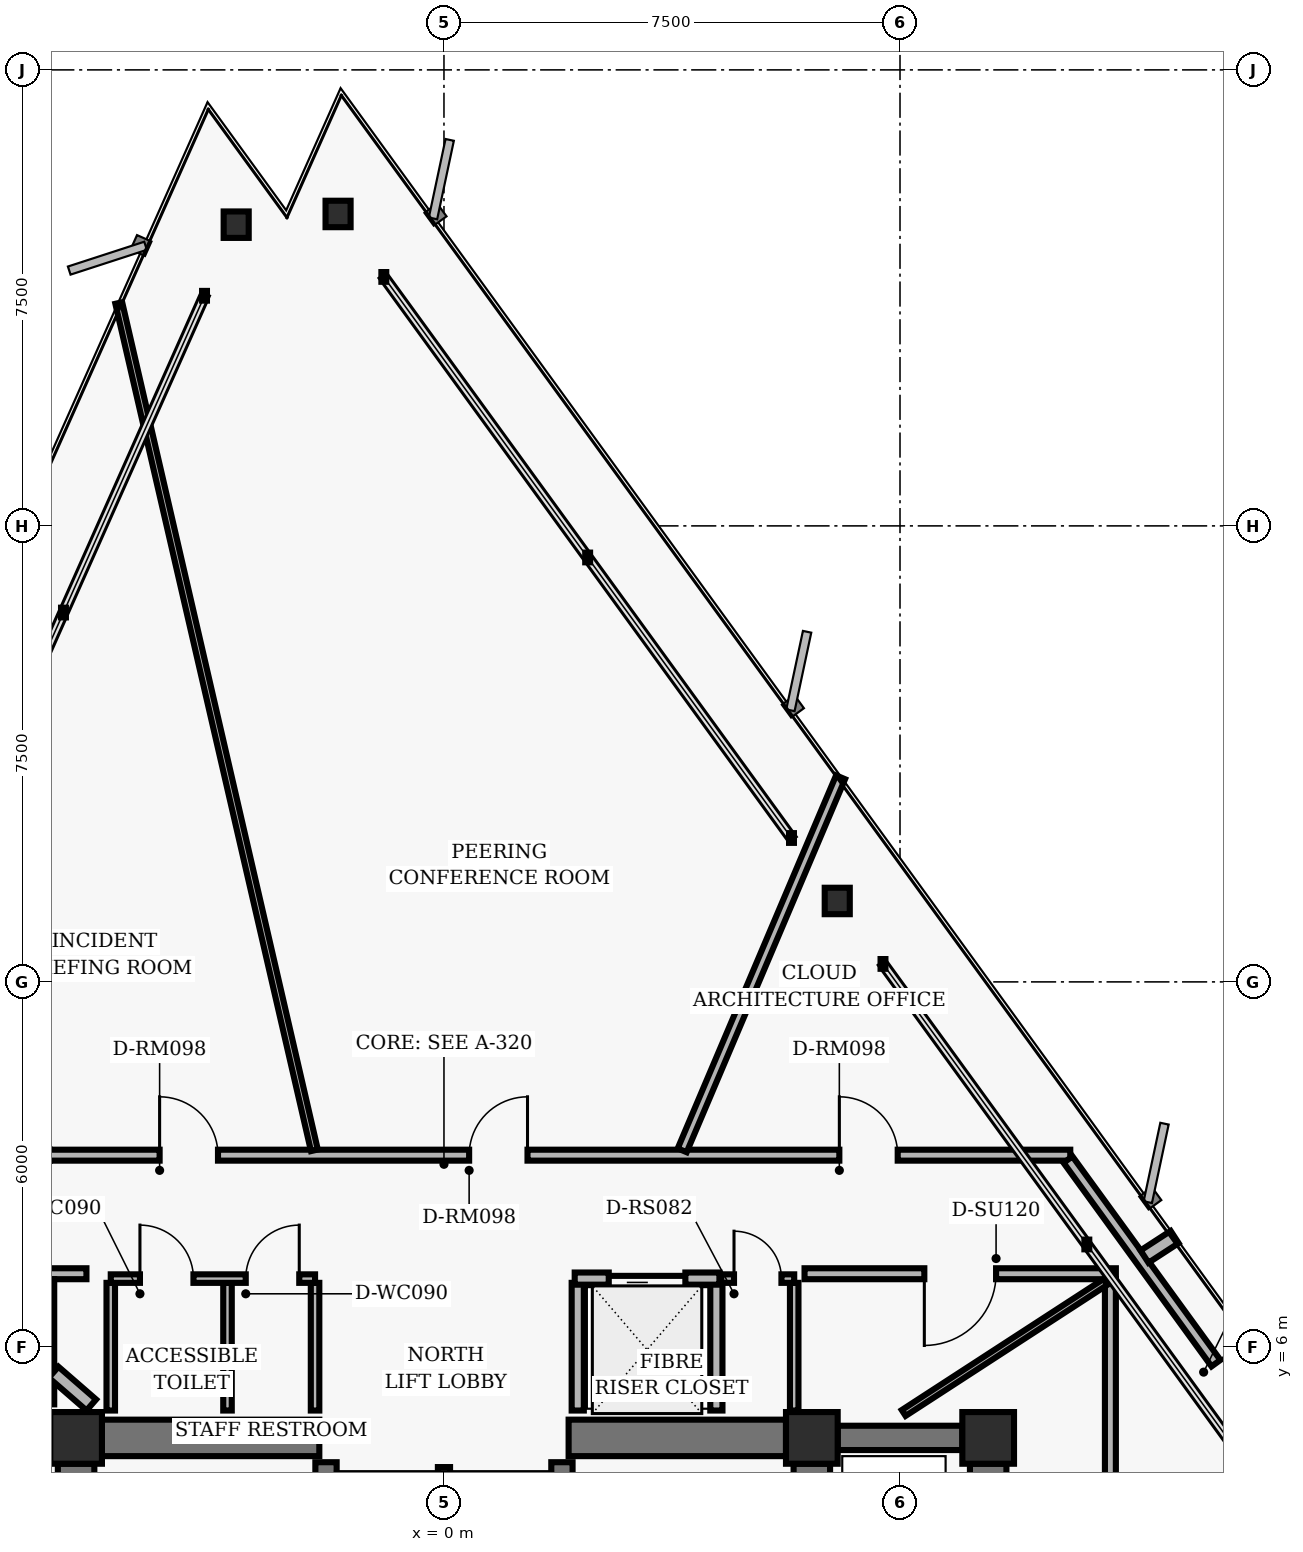
"""IFC4 building model, lengths in metres.
Left out: names, types, materials, properties, quantities, classifications, styles, units other than length and angle.
Written with IfcOpenShell. Run it as: python <this file> out.ifc"""

import sys

from ifc_helpers import new_model, si_unit, direction, frame, frame_2d, origin, origin_2d, place, context, subcontext, project, spatial, rectangle, hollow_rectangle, i_section, extrude, element, fill, save


model = new_model("IFC4")
c1 = context("Model", 3, precision=1e-05, world=origin(), true_north=direction((0.0, 1.0)))
c2 = subcontext(c1, "Body", "Model", "MODEL_VIEW")
j1 = project(units=[si_unit("LENGTHUNIT", "METRE"), si_unit("PLANEANGLEUNIT", "RADIAN")], contexts=[c1])
p1 = place(None, origin())
s1 = spatial("IfcSite", under=j1, at=p1, CompositionType="ELEMENT")
p2 = place(p1, origin())
s2 = spatial("IfcBuilding", under=s1, at=p2, CompositionType="ELEMENT")
p3 = place(p2, frame((0.0, 0.0, 113.76)))
s3 = spatial("IfcBuildingStorey", under=s2, at=p3, CompositionType="ELEMENT", Elevation=113.76)
for number, where, z_axis, x_axis in (
    (1, (-6.05, 4.5, 0.0), (0.0, 0.0, 1.0), (1.0, 0.0, 0.0)),
    (2, (6.05, 4.5, 0.0), (0.0, 0.0, 1.0), (1.0, 0.0, 0.0)),
    (3, (8.95, 4.5, 0.0), (0.0, 0.0, 1.0), (1.0, 0.0, 0.0)),
):
    element("IfcColumn", number, at=place(p3, frame(where, z_axis=z_axis, x_axis=x_axis)), inside=s3, PredefinedType="COLUMN", context=c2, shape_type="SweptSolid", body=[
        extrude(hollow_rectangle(XDim=0.85, YDim=0.85, WallThickness=0.055, InnerFilletRadius=0.02, OuterFilletRadius=0.04, at=origin_2d()), origin(), (0.0, 0.0, 1.0), 3.04),
    ])
for number, where, z_axis, x_axis in (
    (4, (-6.05, 0.425, 0.0), (0.0, 0.0, 1.0), (0.0, 1.0, 0.0)),
    (5, (6.05, 0.425, 0.0), (0.0, 0.0, 1.0), (0.0, 1.0, 0.0)),
):
    element("IfcWall", number, at=place(p3, frame(where, z_axis=z_axis, x_axis=x_axis)), inside=s3, PredefinedType="SHEAR", context=c2, shape_type="SweptSolid", body=[
        extrude(rectangle(XDim=3.65, YDim=0.6, at=frame_2d((1.825, 0.0))), origin(), (0.0, 0.0, 1.0), 2.788),
    ])
for number, where, z_axis, x_axis in (
    (6, (-1.94, -4.1, 0.0), (0.0, 0.0, 1.0), (0.0, 1.0, 0.0)),
    (7, (1.94, -4.1, 0.0), (0.0, 0.0, 1.0), (0.0, 1.0, 0.0)),
):
    element("IfcWall", number, at=place(p3, frame(where, z_axis=z_axis, x_axis=x_axis)), inside=s3, PredefinedType="SHEAR", context=c2, shape_type="SweptSolid", body=[
        extrude(rectangle(XDim=8.2, YDim=0.35, at=frame_2d((4.1, 0.0))), origin(), (0.0, 0.0, 1.0), 2.788),
    ])
for number, where, z_axis, x_axis in (
    (8, (-5.625, 4.5, 0.0), (0.0, 0.0, 1.0), (1.0, 0.0, 0.0)),
    (9, (2.05, 4.5, 0.0), (0.0, 0.0, 1.0), (1.0, 0.0, 0.0)),
):
    element("IfcWall", number, at=place(p3, frame(where, z_axis=z_axis, x_axis=x_axis)), inside=s3, PredefinedType="SHEAR", context=c2, shape_type="SweptSolid", body=[
        extrude(rectangle(XDim=3.575, YDim=0.6, at=frame_2d((1.788, 0.0))), origin(), (0.0, 0.0, 1.0), 2.788),
    ])
p4 = place(p3, frame((8.95, -3.875, 0.0), z_axis=(0.0, 0.0, 1.0), x_axis=(0.0, 1.0, 0.0)))
e10 = element("IfcWall", 10, at=p4, inside=s3, PredefinedType="SHEAR", context=c2, shape_type="SweptSolid", body=[
    extrude(rectangle(XDim=7.95, YDim=0.6, at=frame_2d((3.975, 0.0))), origin(), (0.0, 0.0, 1.0), 2.788),
])
p5 = place(p4, frame((0.55, 0.0, 0.0)))
e11 = element("IfcOpeningElement", 11, at=p5, cuts=e10, PredefinedType="OPENING", context=c2, shape_type="SweptSolid", body=[
    extrude(rectangle(XDim=1.06, YDim=2.04, at=frame_2d((0.53, 1.02))), frame((0.0, 0.31, 0.0), z_axis=(0.0, -1.0, 0.0), x_axis=(1.0, 0.0, 0.0)), (0.0, 0.0, 1.0), 0.62),
])
p6 = place(p4, frame((3.445, 0.0, 0.0)))
e12 = element("IfcOpeningElement", 12, at=p6, cuts=e10, PredefinedType="OPENING", context=c2, shape_type="SweptSolid", body=[
    extrude(rectangle(XDim=1.06, YDim=2.04, at=frame_2d((0.53, 1.02))), frame((0.0, 0.31, 0.0), z_axis=(0.0, -1.0, 0.0), x_axis=(1.0, 0.0, 0.0)), (0.0, 0.0, 1.0), 0.62),
])
p7 = place(p4, frame((6.33, 0.0, 0.0)))
e13 = element("IfcOpeningElement", 13, at=p7, cuts=e10, PredefinedType="OPENING", context=c2, shape_type="SweptSolid", body=[
    extrude(rectangle(XDim=1.06, YDim=2.04, at=frame_2d((0.53, 1.02))), frame((0.0, 0.31, 0.0), z_axis=(0.0, -1.0, 0.0), x_axis=(1.0, 0.0, 0.0)), (0.0, 0.0, 1.0), 0.62),
])
p8 = place(p3, frame((6.475, 4.5, 0.0), z_axis=(0.0, 0.0, 1.0), x_axis=(1.0, 0.0, 0.0)))
e14 = element("IfcWall", 14, at=p8, inside=s3, PredefinedType="SHEAR", context=c2, shape_type="SweptSolid", body=[
    extrude(rectangle(XDim=2.05, YDim=0.4, at=frame_2d((1.025, 0.0))), origin(), (0.0, 0.0, 1.0), 2.788),
])
for number, where, z_axis, x_axis in (
    (15, (6.468, 13.331, 0.0), (0.0, 0.0, 1.0), (1.0, 0.0, 0.0)),
    (16, (-1.742, 24.63, 0.0), (0.0, 0.0, 1.0), (1.0, 0.0, 0.0)),
    (17, (-3.417, 24.454, 0.0), (0.0, 0.0, 1.0), (1.0, 0.0, 0.0)),
):
    element("IfcColumn", number, at=place(p3, frame(where, z_axis=z_axis, x_axis=x_axis)), inside=s3, PredefinedType="COLUMN", context=c2, shape_type="SweptSolid", body=[
        extrude(i_section(OverallWidth=0.412, OverallDepth=0.435, WebThickness=0.036, FlangeThickness=0.057, FilletRadius=0.022, at=origin_2d()), origin(), (0.0, 0.0, 1.0), 3.04),
    ])
p9 = place(p3, frame((0.0, 1.25, 0.0), z_axis=(0.0, 0.0, 1.0), x_axis=(0.0, 1.0, 0.0)))
e18 = element("IfcWall", 18, at=p9, inside=s3, PredefinedType="PARTITIONING", context=c2, shape_type="SweptSolid", body=[
    extrude(rectangle(XDim=2.77, YDim=0.2, at=frame_2d((1.385, 0.0))), origin(), (0.0, 0.0, 1.0), 2.763),
])
p10 = place(p3, frame((2.2, 4.95, 0.0), z_axis=(0.0, 0.0, 1.0), x_axis=(0.0, 1.0, 0.0)))
e19 = element("IfcWall", 19, at=p10, inside=s3, PredefinedType="PARTITIONING", context=c2, shape_type="SweptSolid", body=[
    extrude(rectangle(XDim=2.1, YDim=0.2, at=frame_2d((1.05, 0.0))), origin(), (0.0, 0.0, 1.0), 2.132),
])
p11 = place(p3, frame((4.48, 4.95, 0.0), z_axis=(0.0, 0.0, 1.0), x_axis=(0.0, 1.0, 0.0)))
e20 = element("IfcWall", 20, at=p11, inside=s3, PredefinedType="PARTITIONING", context=c2, shape_type="SweptSolid", body=[
    extrude(rectangle(XDim=2.1, YDim=0.2, at=frame_2d((1.05, 0.0))), origin(), (0.0, 0.0, 1.0), 2.763),
])
p12 = place(p3, frame((2.15, 7.12, 0.0), z_axis=(0.0, 0.0, 1.0), x_axis=(1.0, 0.0, 0.0)))
e21 = element("IfcWall", 21, at=p12, inside=s3, PredefinedType="PARTITIONING", context=c2, shape_type="SweptSolid", body=[
    extrude(rectangle(XDim=2.38, YDim=0.2, at=frame_2d((1.19, 0.0))), origin(), (0.0, 0.0, 1.0), 2.763),
])
p13 = place(p12, frame((0.56, 0.0, 0.0)))
e22 = element("IfcOpeningElement", 22, at=p13, cuts=e21, PredefinedType="OPENING", context=c2, shape_type="SweptSolid", body=[
    extrude(rectangle(XDim=1.26, YDim=2.06, at=frame_2d((0.63, 1.03))), frame((0.0, 0.11, 0.0), z_axis=(0.0, -1.0, 0.0), x_axis=(1.0, 0.0, 0.0)), (0.0, 0.0, 1.0), 0.22),
])
for number, where, z_axis, x_axis in (
    (23, (-5.48, 4.95, 0.0), (0.0, 0.0, 1.0), (0.0, 1.0, 0.0)),
    (24, (-3.56, 4.95, 0.0), (0.0, 0.0, 1.0), (0.0, 1.0, 0.0)),
    (25, (-2.12, 4.95, 0.0), (0.0, 0.0, 1.0), (0.0, 1.0, 0.0)),
):
    element("IfcWall", number, at=place(p3, frame(where, z_axis=z_axis, x_axis=x_axis)), inside=s3, PredefinedType="PARTITIONING", context=c2, shape_type="SweptSolid", body=[
        extrude(rectangle(XDim=2.1, YDim=0.14, at=frame_2d((1.05, 0.0))), origin(), (0.0, 0.0, 1.0), 2.763),
    ])
p14 = place(p3, frame((-5.48, 7.12, 0.0), z_axis=(0.0, 0.0, 1.0), x_axis=(1.0, 0.0, 0.0)))
e26 = element("IfcWall", 26, at=p14, inside=s3, PredefinedType="PARTITIONING", context=c2, shape_type="SweptSolid", body=[
    extrude(rectangle(XDim=3.36, YDim=0.14, at=frame_2d((1.68, 0.0))), origin(), (0.0, 0.0, 1.0), 2.763),
])
p15 = place(p14, frame((0.48, 0.0, 0.0)))
e27 = element("IfcOpeningElement", 27, at=p15, cuts=e26, PredefinedType="OPENING", context=c2, shape_type="SweptSolid", body=[
    extrude(rectangle(XDim=0.88, YDim=2.02, at=frame_2d((0.44, 1.01))), frame((0.0, 0.08, 0.0), z_axis=(0.0, -1.0, 0.0), x_axis=(1.0, 0.0, 0.0)), (0.0, 0.0, 1.0), 0.16),
])
p16 = place(p14, frame((2.22, 0.0, 0.0)))
e28 = element("IfcOpeningElement", 28, at=p16, cuts=e26, PredefinedType="OPENING", context=c2, shape_type="SweptSolid", body=[
    extrude(rectangle(XDim=0.88, YDim=2.02, at=frame_2d((0.44, 1.01))), frame((0.0, 0.08, 0.0), z_axis=(0.0, -1.0, 0.0), x_axis=(1.0, 0.0, 0.0)), (0.0, 0.0, 1.0), 0.16),
])
p17 = place(p3, frame((5.76, 4.95, 0.0), z_axis=(0.0, 0.0, 1.0), x_axis=(0.0, 1.0, 0.0)))
e29 = element("IfcWall", 29, at=p17, inside=s3, PredefinedType="PARTITIONING", context=c2, shape_type="SweptSolid", body=[
    extrude(rectangle(XDim=2.1, YDim=0.14, at=frame_2d((1.05, 0.0))), origin(), (0.0, 0.0, 1.0), 2.132),
])
p18 = place(p3, frame((4.56, 7.12, 0.0), z_axis=(0.0, 0.0, 1.0), x_axis=(1.0, 0.0, 0.0)))
e30 = element("IfcWall", 30, at=p18, inside=s3, PredefinedType="PARTITIONING", context=c2, shape_type="SweptSolid", body=[
    extrude(rectangle(XDim=1.2, YDim=0.14, at=frame_2d((0.6, 0.0))), origin(), (0.0, 0.0, 1.0), 2.763),
])
p19 = place(p18, frame((0.21, 0.0, 0.0)))
e31 = element("IfcOpeningElement", 31, at=p19, cuts=e30, PredefinedType="OPENING", context=c2, shape_type="SweptSolid", body=[
    extrude(rectangle(XDim=0.78, YDim=2.01, at=frame_2d((0.39, 1.005))), frame((0.0, 0.08, 0.0), z_axis=(0.0, -1.0, 0.0), x_axis=(1.0, 0.0, 0.0)), (0.0, 0.0, 1.0), 0.16),
])
p20 = place(p3, frame((-6.52, 9.15, 0.0), z_axis=(0.0, 0.0, 1.0), x_axis=(1.0, 0.0, 0.0)))
e32 = element("IfcWall", 32, at=p20, inside=s3, PredefinedType="PARTITIONING", context=c2, shape_type="SweptSolid", body=[
    extrude(rectangle(XDim=16.82, YDim=0.18, at=frame_2d((8.41, 0.0))), origin(), (0.0, 0.0, 1.0), 2.763),
])
p21 = place(p20, frame((13.022, 0.0, 0.0)))
e33 = element("IfcOpeningElement", 33, at=p21, cuts=e32, PredefinedType="OPENING", context=c2, shape_type="SweptSolid", body=[
    extrude(rectangle(XDim=0.96, YDim=2.02, at=frame_2d((0.48, 1.01))), frame((0.0, 0.1, 0.0), z_axis=(0.0, -1.0, 0.0), x_axis=(1.0, 0.0, 0.0)), (0.0, 0.0, 1.0), 0.2),
])
p22 = place(p20, frame((6.934, 0.0, 0.0)))
e34 = element("IfcOpeningElement", 34, at=p22, cuts=e32, PredefinedType="OPENING", context=c2, shape_type="SweptSolid", body=[
    extrude(rectangle(XDim=0.96, YDim=2.02, at=frame_2d((0.48, 1.01))), frame((0.0, 0.1, 0.0), z_axis=(0.0, -1.0, 0.0), x_axis=(1.0, 0.0, 0.0)), (0.0, 0.0, 1.0), 0.2),
])
p23 = place(p20, frame((1.844, 0.0, 0.0)))
e35 = element("IfcOpeningElement", 35, at=p23, cuts=e32, PredefinedType="OPENING", context=c2, shape_type="SweptSolid", body=[
    extrude(rectangle(XDim=0.96, YDim=2.02, at=frame_2d((0.48, 1.01))), frame((0.0, 0.1, 0.0), z_axis=(0.0, -1.0, 0.0), x_axis=(1.0, 0.0, 0.0)), (0.0, 0.0, 1.0), 0.2),
])
p24 = place(p3, frame((10.263, 9.077, 0.0), z_axis=(0.0, 0.0, 1.0), x_axis=(0.587780951295, -0.809020119215, 0.0)))
e36 = element("IfcWall", 36, at=p24, inside=s3, PredefinedType="PARTITIONING", context=c2, shape_type="SweptSolid", body=[
    extrude(rectangle(XDim=7.469, YDim=0.18, at=frame_2d((3.734, 0.0))), origin(), (0.0, 0.0, 1.0), 2.763),
])
p25 = place(p24, frame((4.139, 0.0, 0.0)))
e37 = element("IfcOpeningElement", 37, at=p25, cuts=e36, PredefinedType="OPENING", context=c2, shape_type="SweptSolid", body=[
    extrude(rectangle(XDim=0.96, YDim=2.02, at=frame_2d((0.48, 1.01))), frame((0.0, 0.1, 0.0), z_axis=(0.0, -1.0, 0.0), x_axis=(1.0, 0.0, 0.0)), (0.0, 0.0, 1.0), 0.2),
])
p26 = place(p3, frame((10.96, 3.84, 0.0), z_axis=(0.0, 0.0, 1.0), x_axis=(0.0, 1.0, 0.0)))
e38 = element("IfcWall", 38, at=p26, inside=s3, PredefinedType="PARTITIONING", context=c2, shape_type="SweptSolid", body=[
    extrude(rectangle(XDim=3.271, YDim=0.18, at=frame_2d((1.635, 0.0))), origin(), (0.0, 0.0, 1.0), 2.763),
])
p27 = place(p3, frame((11.05, 7.2, 0.0), z_axis=(0.0, 0.0, 1.0), x_axis=(-1.0, 0.0, 0.0)))
e39 = element("IfcWall", 39, at=p27, inside=s3, PredefinedType="PARTITIONING", context=c2, shape_type="SweptSolid", body=[
    extrude(rectangle(XDim=5.12, YDim=0.18, at=frame_2d((2.56, 0.0))), origin(), (0.0, 0.0, 1.0), 2.763),
])
p28 = place(p27, frame((1.97, 0.0, 0.0)))
e40 = element("IfcOpeningElement", 40, at=p28, cuts=e39, PredefinedType="OPENING", context=c2, shape_type="SweptSolid", body=[
    extrude(rectangle(XDim=1.18, YDim=2.02, at=frame_2d((0.59, 1.01))), frame((0.0, 0.1, 0.0), z_axis=(0.0, -1.0, 0.0), x_axis=(1.0, 0.0, 0.0)), (0.0, 0.0, 1.0), 0.2),
])
p29 = place(p3, frame((-5.88, 7.2, 0.0), z_axis=(0.0, 0.0, 1.0), x_axis=(-1.0, 0.0, 0.0)))
e41 = element("IfcWall", 41, at=p29, inside=s3, PredefinedType="PARTITIONING", context=c2, shape_type="SweptSolid", body=[
    extrude(rectangle(XDim=0.71, YDim=0.18, at=frame_2d((0.355, 0.0))), origin(), (0.0, 0.0, 1.0), 2.763),
])
p30 = place(p3, frame((-6.5, 7.11, 0.0), z_axis=(0.0, 0.0, 1.0), x_axis=(0.0, -1.0, 0.0)))
e42 = element("IfcWall", 42, at=p30, inside=s3, PredefinedType="PARTITIONING", context=c2, shape_type="SweptSolid", body=[
    extrude(rectangle(XDim=2.058, YDim=0.18, at=frame_2d((1.029, 0.0))), origin(), (0.0, 0.0, 1.0), 2.763),
])
p31 = place(p3, frame((7.561, 4.91, 0.0), z_axis=(0.0, 0.0, 1.0), x_axis=(0.838633829817, 0.544695602595, 0.0)))
e43 = element("IfcWall", 43, at=p31, inside=s3, PredefinedType="MOVABLE", context=c2, shape_type="SweptSolid", body=[
    extrude(rectangle(XDim=3.958, YDim=0.115, at=frame_2d((1.979, 0.0))), origin(), (0.0, 0.0, 1.0), 2.763),
])
p32 = place(p3, frame((11.521, 7.482, 0.0), z_axis=(0.0, 0.0, 1.0), x_axis=(0.838415292805, 0.545031922726, 0.0)))
e44 = element("IfcWall", 44, at=p32, inside=s3, PredefinedType="PARTITIONING", context=c2, shape_type="SweptSolid", body=[
    extrude(rectangle(XDim=0.591, YDim=0.24, at=frame_2d((0.295, 0.0))), origin(), (0.0, 0.0, 1.0), 2.763),
])
p33 = place(p3, frame((3.918, 9.23, 0.0), z_axis=(0.0, 0.0, 1.0), x_axis=(0.390716336296, 0.920511132226, 0.0)))
e45 = element("IfcWall", 45, at=p33, inside=s3, PredefinedType="PARTITIONING", context=c2, shape_type="SweptSolid", body=[
    extrude(rectangle(XDim=6.665, YDim=0.16, at=frame_2d((3.333, 0.0))), origin(), (0.0, 0.0, 1.0), 2.763),
])
p34 = place(p3, frame((-2.131, 9.23, 0.0), z_axis=(0.0, 0.0, 1.0), x_axis=(-0.224960484743, 0.974367887558, 0.0)))
e46 = element("IfcWall", 46, at=p34, inside=s3, PredefinedType="MOVABLE", context=c2, shape_type="SweptSolid", body=[
    extrude(rectangle(XDim=14.303, YDim=0.115, at=frame_2d((7.151, 0.0))), origin(), (0.0, 0.0, 1.0), 2.763),
])
p35 = place(p3, frame((-5.8, 5.042, 0.0), z_axis=(0.0, 0.0, 1.0), x_axis=(-0.754727098443, 0.65603887604, 0.0)))
e47 = element("IfcWall", 47, at=p35, inside=s3, PredefinedType="PARTITIONING", context=c2, shape_type="SweptSolid", body=[
    extrude(rectangle(XDim=0.821, YDim=0.24, at=frame_2d((0.411, 0.0))), origin(), (0.0, 0.0, 1.0), 2.763),
])
p36 = place(p13, origin())
e48 = element("IfcDoor", 48, at=p36, inside=s3, OperationType="SLIDING_TO_LEFT", PredefinedType="DOOR", context=c2, shape_type="SweptSolid", body=[
    extrude(rectangle(XDim=1.26, YDim=2.06, at=frame_2d((0.63, 1.03))), frame((0.0, 0.025, 0.0), z_axis=(0.0, -1.0, 0.0), x_axis=(1.0, 0.0, 0.0)), (0.0, 0.0, 1.0), 0.05),
])
fill(e22, e48)
p37 = place(p15, origin())
e49 = element("IfcDoor", 49, at=p37, inside=s3, OperationType="SINGLE_SWING_LEFT", PredefinedType="DOOR", context=c2, shape_type="SweptSolid", body=[
    extrude(rectangle(XDim=0.88, YDim=2.02, at=frame_2d((0.44, 1.01))), frame((0.0, 0.025, 0.0), z_axis=(0.0, -1.0, 0.0), x_axis=(1.0, 0.0, 0.0)), (0.0, 0.0, 1.0), 0.05),
])
fill(e27, e49)
p38 = place(p16, origin())
e50 = element("IfcDoor", 50, at=p38, inside=s3, OperationType="SINGLE_SWING_RIGHT", PredefinedType="DOOR", context=c2, shape_type="SweptSolid", body=[
    extrude(rectangle(XDim=0.88, YDim=2.02, at=frame_2d((0.44, 1.01))), frame((0.0, 0.025, 0.0), z_axis=(0.0, -1.0, 0.0), x_axis=(1.0, 0.0, 0.0)), (0.0, 0.0, 1.0), 0.05),
])
fill(e28, e50)
p39 = place(p19, origin())
e51 = element("IfcDoor", 51, at=p39, inside=s3, OperationType="SINGLE_SWING_LEFT", PredefinedType="DOOR", context=c2, shape_type="SweptSolid", body=[
    extrude(rectangle(XDim=0.78, YDim=2.01, at=frame_2d((0.39, 1.005))), frame((0.0, 0.025, 0.0), z_axis=(0.0, -1.0, 0.0), x_axis=(1.0, 0.0, 0.0)), (0.0, 0.0, 1.0), 0.05),
])
fill(e31, e51)
p40 = place(p25, origin())
e52 = element("IfcDoor", 52, at=p40, inside=s3, OperationType="SINGLE_SWING_LEFT", PredefinedType="DOOR", context=c2, shape_type="SweptSolid", body=[
    extrude(rectangle(XDim=0.96, YDim=2.02, at=frame_2d((0.48, 1.01))), frame((0.0, 0.025, 0.0), z_axis=(0.0, -1.0, 0.0), x_axis=(1.0, 0.0, 0.0)), (0.0, 0.0, 1.0), 0.05),
])
fill(e37, e52)
p41 = place(p28, origin())
e53 = element("IfcDoor", 53, at=p41, inside=s3, OperationType="SINGLE_SWING_RIGHT", PredefinedType="DOOR", context=c2, shape_type="SweptSolid", body=[
    extrude(rectangle(XDim=1.18, YDim=2.02, at=frame_2d((0.59, 1.01))), frame((0.0, 0.025, 0.0), z_axis=(0.0, -1.0, 0.0), x_axis=(1.0, 0.0, 0.0)), (0.0, 0.0, 1.0), 0.05),
])
fill(e40, e53)
p42 = place(p21, origin())
e54 = element("IfcDoor", 54, at=p42, inside=s3, OperationType="SINGLE_SWING_LEFT", PredefinedType="DOOR", context=c2, shape_type="SweptSolid", body=[
    extrude(rectangle(XDim=0.96, YDim=2.02, at=frame_2d((0.48, 1.01))), frame((0.0, 0.025, 0.0), z_axis=(0.0, -1.0, 0.0), x_axis=(1.0, 0.0, 0.0)), (0.0, 0.0, 1.0), 0.05),
])
fill(e33, e54)
p43 = place(p22, origin())
e55 = element("IfcDoor", 55, at=p43, inside=s3, OperationType="SINGLE_SWING_RIGHT", PredefinedType="DOOR", context=c2, shape_type="SweptSolid", body=[
    extrude(rectangle(XDim=0.96, YDim=2.02, at=frame_2d((0.48, 1.01))), frame((0.0, 0.025, 0.0), z_axis=(0.0, -1.0, 0.0), x_axis=(1.0, 0.0, 0.0)), (0.0, 0.0, 1.0), 0.05),
])
fill(e34, e55)
p44 = place(p23, origin())
e56 = element("IfcDoor", 56, at=p44, inside=s3, OperationType="SINGLE_SWING_LEFT", PredefinedType="DOOR", context=c2, shape_type="SweptSolid", body=[
    extrude(rectangle(XDim=0.96, YDim=2.02, at=frame_2d((0.48, 1.01))), frame((0.0, 0.025, 0.0), z_axis=(0.0, -1.0, 0.0), x_axis=(1.0, 0.0, 0.0)), (0.0, 0.0, 1.0), 0.05),
])
fill(e35, e56)
save(model, sys.argv[1])
